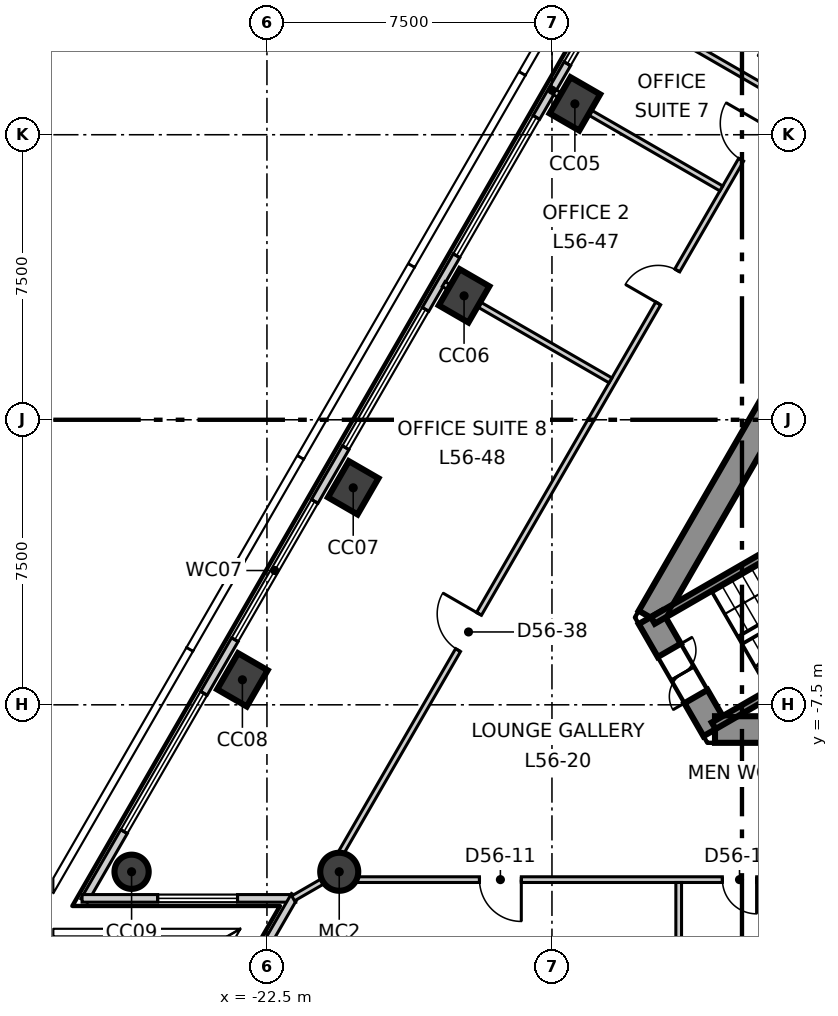
"""IFC4 building model, lengths in metres.
Left out: names, types, materials, properties, quantities, classifications, styles, units other than length and angle.
Written with IfcOpenShell. Run it as: python <this file> out.ifc"""

import sys

from ifc_helpers import new_model, si_unit, direction, frame, frame_2d, origin, origin_2d, place, context, subcontext, project, spatial, polyline, rectangle, circle, outline, extrude, element, fill, save


model = new_model("IFC4")
c1 = context("Model", 3, precision=1e-05, world=origin(), true_north=direction((0.0, 1.0)))
c2 = subcontext(c1, "Body", "Model", "MODEL_VIEW")
j1 = project(units=[si_unit("LENGTHUNIT", "METRE"), si_unit("PLANEANGLEUNIT", "RADIAN")], contexts=[c1])
p1 = place(None, origin())
s1 = spatial("IfcSite", under=j1, at=p1, CompositionType="ELEMENT")
p2 = place(p1, origin())
s2 = spatial("IfcBuilding", under=s1, at=p2, CompositionType="ELEMENT")
p3 = place(p2, frame((0.0, 0.0, 239.3)))
s3 = spatial("IfcBuildingStorey", under=s2, at=p3, CompositionType="ELEMENT", Elevation=239.3)
p4 = place(p3, frame((-1.703, 13.35, -0.3), z_axis=(0.0, 0.0, 1.0), x_axis=(-0.500011533395, -0.866018744874, 0.0)))
e1 = element("IfcWall", 1, at=p4, inside=s3, PredefinedType="SHEAR", context=c2, shape_type="SweptSolid", body=[
    extrude(outline(polyline([(-0.202, -0.35), (1.782, -0.35), (3.766, -0.35), (5.75, -0.35), (7.734, -0.35), (9.718, -0.35), (11.702, -0.35), (13.686, -0.35), (15.67, -0.35), (17.654, -0.35), (19.638, -0.35), (21.622, -0.35), (21.218, 0.35), (19.307, 0.35), (17.397, 0.35), (15.486, 0.35), (13.576, 0.35), (11.665, 0.35), (9.755, 0.35), (7.844, 0.35), (5.934, 0.35), (4.023, 0.35), (2.113, 0.35), (0.202, 0.35), (-0.202, -0.35)])), origin(), (0.0, 0.0, 1.0), 4.0),
])
p5 = place(p4, frame((10.16, 0.0, 0.3)))
e2 = element("IfcOpeningElement", 2, at=p5, cuts=e1, PredefinedType="OPENING", context=c2, shape_type="SweptSolid", body=[
    extrude(rectangle(XDim=1.1, YDim=2.1, at=frame_2d((0.55, 1.05))), frame((0.0, 0.36, 0.0), z_axis=(0.0, -1.0, 0.0), x_axis=(1.0, 0.0, 0.0)), (0.0, 0.0, 1.0), 0.72),
])
p6 = place(p3, frame((-12.413, -5.2, -0.3), z_axis=(0.0, 0.0, 1.0), x_axis=(0.49999337185, -0.866029230515, 0.0)))
e3 = element("IfcWall", 3, at=p6, inside=s3, PredefinedType="SHEAR", context=c2, shape_type="SweptSolid", body=[
    extrude(outline(polyline([(-0.202, -0.35), (1.703, -0.35), (3.608, -0.35), (3.204, 0.35), (1.703, 0.35), (0.202, 0.35), (-0.202, -0.35)])), origin(), (0.0, 0.0, 1.0), 4.0),
])
p7 = place(p6, frame((1.003, 0.0, 0.3)))
e4 = element("IfcOpeningElement", 4, at=p7, cuts=e3, PredefinedType="OPENING", context=c2, shape_type="SweptSolid", body=[
    extrude(rectangle(XDim=1.4, YDim=2.1, at=frame_2d((0.7, 1.05))), frame((0.0, 0.36, 0.0), z_axis=(0.0, -1.0, 0.0), x_axis=(1.0, 0.0, 0.0)), (0.0, 0.0, 1.0), 0.72),
])
p8 = place(p3, frame((-10.71, -8.15, -0.3), z_axis=(0.0, 0.0, 1.0), x_axis=(1.0, 0.0, 0.0)))
e5 = element("IfcWall", 5, at=p8, inside=s3, PredefinedType="SHEAR", context=c2, shape_type="SweptSolid", body=[
    extrude(outline(polyline([(-0.202, -0.35), (1.782, -0.35), (3.766, -0.35), (5.75, -0.35), (7.734, -0.35), (9.718, -0.35), (11.702, -0.35), (13.686, -0.35), (15.67, -0.35), (17.654, -0.35), (19.638, -0.35), (21.622, -0.35), (21.218, 0.35), (19.307, 0.35), (17.397, 0.35), (15.486, 0.35), (13.576, 0.35), (11.665, 0.35), (9.755, 0.35), (7.844, 0.35), (5.934, 0.35), (4.023, 0.35), (2.113, 0.35), (0.202, 0.35), (-0.202, -0.35)])), origin(), (0.0, 0.0, 1.0), 4.0),
])
p9 = place(p8, frame((9.81, 0.0, 0.3)))
e6 = element("IfcOpeningElement", 6, at=p9, cuts=e5, PredefinedType="OPENING", context=c2, shape_type="SweptSolid", body=[
    extrude(rectangle(XDim=1.8, YDim=2.1, at=frame_2d((0.9, 1.05))), frame((0.0, 0.36, 0.0), z_axis=(0.0, -1.0, 0.0), x_axis=(1.0, 0.0, 0.0)), (0.0, 0.0, 1.0), 0.72),
])
for number, where, z_axis, x_axis in (
    (7, (-14.397, 8.312, -0.3), (0.0, 0.0, 1.0), (0.5, 0.866, 0.0)),
    (8, (-17.313, 3.261, -0.3), (0.0, 0.0, 1.0), (0.5, 0.866, 0.0)),
    (9, (-20.23, -1.79, -0.3), (0.0, 0.0, 1.0), (0.5, 0.866, 0.0)),
    (10, (-23.146, -6.842, -0.3), (0.0, 0.0, 1.0), (0.5, 0.866, 0.0)),
):
    element("IfcColumn", number, at=place(p3, frame(where, z_axis=z_axis, x_axis=x_axis)), inside=s3, PredefinedType="COLUMN", context=c2, shape_type="SweptSolid", body=[
        extrude(rectangle(XDim=1.1, YDim=0.9, at=origin_2d()), origin(), (0.0, 0.0, 1.0), 4.0),
    ])
p10 = place(p3, frame((-26.062, -11.893, -0.3), z_axis=(0.0, 0.0, 1.0), x_axis=(0.5, 0.866025403784, 0.0)))
e11 = element("IfcColumn", 11, at=p10, inside=s3, PredefinedType="COLUMN", context=c2, shape_type="SweptSolid", body=[
    extrude(circle(Radius=0.45, at=origin_2d()), origin(), (0.0, 0.0, 1.0), 4.0),
])
p11 = place(p3, frame((-20.598, -11.893, -0.3), z_axis=(0.0, 0.0, 1.0), x_axis=(1.0, 0.0, 0.0)))
e12 = element("IfcColumn", 12, at=p11, inside=s3, PredefinedType="COLUMN", context=c2, shape_type="SweptSolid", body=[
    extrude(circle(Radius=0.5, at=origin_2d()), origin(), (0.0, 0.0, 1.0), 4.0),
])
p12 = place(p3, frame((-2.687, 29.995, 0.0), z_axis=(0.0, 0.0, 1.0), x_axis=(-0.499992950893, -0.86602947355, 0.0)))
e13 = element("IfcWall", 13, at=p12, inside=s3, PredefinedType="ELEMENTEDWALL", context=c2, shape_type="SweptSolid", body=[
    extrude(rectangle(XDim=49.247, YDim=0.2, at=frame_2d((24.624, 0.0))), origin(), (0.0, 0.0, 1.0), 3.7),
])
p13 = place(p12, frame((2.119, 0.0, 0.9)))
e14 = element("IfcOpeningElement", 14, at=p13, cuts=e13, PredefinedType="OPENING", context=c2, shape_type="SweptSolid", body=[
    extrude(rectangle(XDim=4.2, YDim=2.5, at=frame_2d((2.1, 1.25))), frame((0.0, 0.11, 0.0), z_axis=(0.0, -1.0, 0.0), x_axis=(1.0, 0.0, 0.0)), (0.0, 0.0, 1.0), 0.22),
])
p14 = place(p12, frame((7.951, 0.0, 0.9)))
e15 = element("IfcOpeningElement", 15, at=p14, cuts=e13, PredefinedType="OPENING", context=c2, shape_type="SweptSolid", body=[
    extrude(rectangle(XDim=4.2, YDim=2.5, at=frame_2d((2.1, 1.25))), frame((0.0, 0.11, 0.0), z_axis=(0.0, -1.0, 0.0), x_axis=(1.0, 0.0, 0.0)), (0.0, 0.0, 1.0), 0.22),
])
p15 = place(p12, frame((13.784, 0.0, 0.9)))
e16 = element("IfcOpeningElement", 16, at=p15, cuts=e13, PredefinedType="OPENING", context=c2, shape_type="SweptSolid", body=[
    extrude(rectangle(XDim=4.2, YDim=2.5, at=frame_2d((2.1, 1.25))), frame((0.0, 0.11, 0.0), z_axis=(0.0, -1.0, 0.0), x_axis=(1.0, 0.0, 0.0)), (0.0, 0.0, 1.0), 0.22),
])
p16 = place(p12, frame((19.617, 0.0, 0.9)))
e17 = element("IfcOpeningElement", 17, at=p16, cuts=e13, PredefinedType="OPENING", context=c2, shape_type="SweptSolid", body=[
    extrude(rectangle(XDim=4.2, YDim=2.5, at=frame_2d((2.1, 1.25))), frame((0.0, 0.11, 0.0), z_axis=(0.0, -1.0, 0.0), x_axis=(1.0, 0.0, 0.0)), (0.0, 0.0, 1.0), 0.22),
])
p17 = place(p12, frame((25.449, 0.0, 0.9)))
e18 = element("IfcOpeningElement", 18, at=p17, cuts=e13, PredefinedType="OPENING", context=c2, shape_type="SweptSolid", body=[
    extrude(rectangle(XDim=4.2, YDim=2.5, at=frame_2d((2.1, 1.25))), frame((0.0, 0.11, 0.0), z_axis=(0.0, -1.0, 0.0), x_axis=(1.0, 0.0, 0.0)), (0.0, 0.0, 1.0), 0.22),
])
p18 = place(p12, frame((31.282, 0.0, 0.9)))
e19 = element("IfcOpeningElement", 19, at=p18, cuts=e13, PredefinedType="OPENING", context=c2, shape_type="SweptSolid", body=[
    extrude(rectangle(XDim=4.2, YDim=2.5, at=frame_2d((2.1, 1.25))), frame((0.0, 0.11, 0.0), z_axis=(0.0, -1.0, 0.0), x_axis=(1.0, 0.0, 0.0)), (0.0, 0.0, 1.0), 0.22),
])
p19 = place(p12, frame((37.115, 0.0, 0.9)))
e20 = element("IfcOpeningElement", 20, at=p19, cuts=e13, PredefinedType="OPENING", context=c2, shape_type="SweptSolid", body=[
    extrude(rectangle(XDim=4.2, YDim=2.5, at=frame_2d((2.1, 1.25))), frame((0.0, 0.11, 0.0), z_axis=(0.0, -1.0, 0.0), x_axis=(1.0, 0.0, 0.0)), (0.0, 0.0, 1.0), 0.22),
])
p20 = place(p12, frame((42.947, 0.0, 0.9)))
e21 = element("IfcOpeningElement", 21, at=p20, cuts=e13, PredefinedType="OPENING", context=c2, shape_type="SweptSolid", body=[
    extrude(rectangle(XDim=4.2, YDim=2.5, at=frame_2d((2.1, 1.25))), frame((0.0, 0.11, 0.0), z_axis=(0.0, -1.0, 0.0), x_axis=(1.0, 0.0, 0.0)), (0.0, 0.0, 1.0), 0.22),
])
p21 = place(p3, frame((-27.365, -12.593, 0.0), z_axis=(0.0, 0.0, 1.0), x_axis=(1.0, 0.0, 0.0)))
e22 = element("IfcWall", 22, at=p21, inside=s3, PredefinedType="ELEMENTEDWALL", context=c2, shape_type="SweptSolid", body=[
    extrude(rectangle(XDim=5.624, YDim=0.2, at=frame_2d((2.812, 0.0))), origin(), (0.0, 0.0, 1.0), 3.7),
])
p22 = place(p21, frame((1.99, 0.0, 0.9)))
e23 = element("IfcOpeningElement", 23, at=p22, cuts=e22, PredefinedType="OPENING", context=c2, shape_type="SweptSolid", body=[
    extrude(rectangle(XDim=2.1, YDim=2.5, at=frame_2d((1.05, 1.25))), frame((0.0, 0.11, 0.0), z_axis=(0.0, -1.0, 0.0), x_axis=(1.0, 0.0, 0.0)), (0.0, 0.0, 1.0), 0.22),
])
p23 = place(p3, frame((-21.766, -12.515, 0.0), z_axis=(0.0, 0.0, 1.0), x_axis=(-0.500000548001, -0.866025087395, 0.0)))
e24 = element("IfcWall", 24, at=p23, inside=s3, PredefinedType="ELEMENTEDWALL", context=c2, shape_type="SweptSolid", body=[
    extrude(rectangle(XDim=5.624, YDim=0.2, at=frame_2d((2.812, 0.0))), origin(), (0.0, 0.0, 1.0), 3.7),
])
p24 = place(p23, frame((1.39, 0.0, 0.9)))
e25 = element("IfcOpeningElement", 25, at=p24, cuts=e24, PredefinedType="OPENING", context=c2, shape_type="SweptSolid", body=[
    extrude(rectangle(XDim=2.1, YDim=2.5, at=frame_2d((1.05, 1.25))), frame((0.0, 0.11, 0.0), z_axis=(0.0, -1.0, 0.0), x_axis=(1.0, 0.0, 0.0)), (0.0, 0.0, 1.0), 0.22),
])
p25 = place(p3, frame((-21.811, -12.593, 0.0), z_axis=(0.0, 0.0, 1.0), x_axis=(0.866086641072, 0.499893918903, 0.0)))
e26 = element("IfcWall", 26, at=p25, inside=s3, PredefinedType="PARTITIONING", context=c2, shape_type="SweptSolid", body=[
    extrude(rectangle(XDim=0.986, YDim=0.15, at=frame_2d((0.493, 0.0))), origin(), (0.0, 0.0, 1.0), 3.7),
])
p26 = place(p3, frame((-20.807, -12.1, 0.0), z_axis=(0.0, 0.0, 1.0), x_axis=(1.0, 0.0, 0.0)))
e27 = element("IfcWall", 27, at=p26, inside=s3, PredefinedType="PARTITIONING", context=c2, shape_type="SweptSolid", body=[
    extrude(rectangle(XDim=41.764, YDim=0.15, at=frame_2d((20.882, 0.0))), origin(), (0.0, 0.0, 1.0), 3.7),
])
p27 = place(p26, frame((3.9, 0.0, 0.0)))
e28 = element("IfcOpeningElement", 28, at=p27, cuts=e27, PredefinedType="OPENING", context=c2, shape_type="SweptSolid", body=[
    extrude(rectangle(XDim=1.1, YDim=2.1, at=frame_2d((0.55, 1.05))), frame((0.0, 0.085, 0.0), z_axis=(0.0, -1.0, 0.0), x_axis=(1.0, 0.0, 0.0)), (0.0, 0.0, 1.0), 0.17),
])
p28 = place(p26, frame((18.792, 0.0, 0.0)))
e29 = element("IfcOpeningElement", 29, at=p28, cuts=e27, PredefinedType="OPENING", context=c2, shape_type="SweptSolid", body=[
    extrude(rectangle(XDim=1.1, YDim=2.1, at=frame_2d((0.55, 1.05))), frame((0.0, 0.085, 0.0), z_axis=(0.0, -1.0, 0.0), x_axis=(1.0, 0.0, 0.0)), (0.0, 0.0, 1.0), 0.17),
])
p29 = place(p26, frame((10.292, 0.0, 0.0)))
e30 = element("IfcOpeningElement", 30, at=p29, cuts=e27, PredefinedType="OPENING", context=c2, shape_type="SweptSolid", body=[
    extrude(rectangle(XDim=0.9, YDim=2.1, at=frame_2d((0.45, 1.05))), frame((0.0, 0.085, 0.0), z_axis=(0.0, -1.0, 0.0), x_axis=(1.0, 0.0, 0.0)), (0.0, 0.0, 1.0), 0.17),
])
p30 = place(p26, frame((13.492, 0.0, 0.0)))
e31 = element("IfcOpeningElement", 31, at=p30, cuts=e27, PredefinedType="OPENING", context=c2, shape_type="SweptSolid", body=[
    extrude(rectangle(XDim=0.9, YDim=2.1, at=frame_2d((0.45, 1.05))), frame((0.0, 0.085, 0.0), z_axis=(0.0, -1.0, 0.0), x_axis=(1.0, 0.0, 0.0)), (0.0, 0.0, 1.0), 0.17),
])
p31 = place(p26, frame((16.292, 0.0, 0.0)))
e32 = element("IfcOpeningElement", 32, at=p31, cuts=e27, PredefinedType="OPENING", context=c2, shape_type="SweptSolid", body=[
    extrude(rectangle(XDim=1.0, YDim=2.1, at=frame_2d((0.5, 1.05))), frame((0.0, 0.085, 0.0), z_axis=(0.0, -1.0, 0.0), x_axis=(1.0, 0.0, 0.0)), (0.0, 0.0, 1.0), 0.17),
])
p32 = place(p26, frame((29.057, 0.0, 0.0)))
e33 = element("IfcOpeningElement", 33, at=p32, cuts=e27, PredefinedType="OPENING", context=c2, shape_type="SweptSolid", body=[
    extrude(rectangle(XDim=1.1, YDim=2.1, at=frame_2d((0.55, 1.05))), frame((0.0, 0.085, 0.0), z_axis=(0.0, -1.0, 0.0), x_axis=(1.0, 0.0, 0.0)), (0.0, 0.0, 1.0), 0.17),
])
p33 = place(p26, frame((22.157, 0.0, 0.0)))
e34 = element("IfcOpeningElement", 34, at=p33, cuts=e27, PredefinedType="OPENING", context=c2, shape_type="SweptSolid", body=[
    extrude(rectangle(XDim=0.9, YDim=2.1, at=frame_2d((0.45, 1.05))), frame((0.0, 0.085, 0.0), z_axis=(0.0, -1.0, 0.0), x_axis=(1.0, 0.0, 0.0)), (0.0, 0.0, 1.0), 0.17),
])
p34 = place(p26, frame((25.157, 0.0, 0.0)))
e35 = element("IfcOpeningElement", 35, at=p34, cuts=e27, PredefinedType="OPENING", context=c2, shape_type="SweptSolid", body=[
    extrude(rectangle(XDim=0.9, YDim=2.1, at=frame_2d((0.45, 1.05))), frame((0.0, 0.085, 0.0), z_axis=(0.0, -1.0, 0.0), x_axis=(1.0, 0.0, 0.0)), (0.0, 0.0, 1.0), 0.17),
])
p35 = place(p26, frame((36.522, 0.0, 0.0)))
e36 = element("IfcOpeningElement", 36, at=p35, cuts=e27, PredefinedType="OPENING", context=c2, shape_type="SweptSolid", body=[
    extrude(rectangle(XDim=1.1, YDim=2.1, at=frame_2d((0.55, 1.05))), frame((0.0, 0.085, 0.0), z_axis=(0.0, -1.0, 0.0), x_axis=(1.0, 0.0, 0.0)), (0.0, 0.0, 1.0), 0.17),
])
p36 = place(p3, frame((-20.883, -11.97, 0.0), z_axis=(0.0, 0.0, 1.0), x_axis=(0.500006150555, 0.866021852731, 0.0)))
e37 = element("IfcWall", 37, at=p36, inside=s3, PredefinedType="PARTITIONING", context=c2, shape_type="SweptSolid", body=[
    extrude(rectangle(XDim=41.766, YDim=0.15, at=frame_2d((20.883, 0.0))), origin(), (0.0, 0.0, 1.0), 3.7),
])
p37 = place(p36, frame((36.616, 0.0, 0.0)))
e38 = element("IfcOpeningElement", 38, at=p37, cuts=e37, PredefinedType="OPENING", context=c2, shape_type="SweptSolid", body=[
    extrude(rectangle(XDim=1.1, YDim=2.1, at=frame_2d((0.55, 1.05))), frame((0.0, 0.085, 0.0), z_axis=(0.0, -1.0, 0.0), x_axis=(1.0, 0.0, 0.0)), (0.0, 0.0, 1.0), 0.17),
])
p38 = place(p36, frame((21.723, 0.0, 0.0)))
e39 = element("IfcOpeningElement", 39, at=p38, cuts=e37, PredefinedType="OPENING", context=c2, shape_type="SweptSolid", body=[
    extrude(rectangle(XDim=1.1, YDim=2.1, at=frame_2d((0.55, 1.05))), frame((0.0, 0.085, 0.0), z_axis=(0.0, -1.0, 0.0), x_axis=(1.0, 0.0, 0.0)), (0.0, 0.0, 1.0), 0.17),
])
p39 = place(p36, frame((30.423, 0.0, 0.0)))
e40 = element("IfcOpeningElement", 40, at=p39, cuts=e37, PredefinedType="OPENING", context=c2, shape_type="SweptSolid", body=[
    extrude(rectangle(XDim=0.9, YDim=2.1, at=frame_2d((0.45, 1.05))), frame((0.0, 0.085, 0.0), z_axis=(0.0, -1.0, 0.0), x_axis=(1.0, 0.0, 0.0)), (0.0, 0.0, 1.0), 0.17),
])
p40 = place(p36, frame((27.223, 0.0, 0.0)))
e41 = element("IfcOpeningElement", 41, at=p40, cuts=e37, PredefinedType="OPENING", context=c2, shape_type="SweptSolid", body=[
    extrude(rectangle(XDim=0.9, YDim=2.1, at=frame_2d((0.45, 1.05))), frame((0.0, 0.085, 0.0), z_axis=(0.0, -1.0, 0.0), x_axis=(1.0, 0.0, 0.0)), (0.0, 0.0, 1.0), 0.17),
])
p41 = place(p36, frame((24.323, 0.0, 0.0)))
e42 = element("IfcOpeningElement", 42, at=p41, cuts=e37, PredefinedType="OPENING", context=c2, shape_type="SweptSolid", body=[
    extrude(rectangle(XDim=1.0, YDim=2.1, at=frame_2d((0.5, 1.05))), frame((0.0, 0.085, 0.0), z_axis=(0.0, -1.0, 0.0), x_axis=(1.0, 0.0, 0.0)), (0.0, 0.0, 1.0), 0.17),
])
p42 = place(p36, frame((17.358, 0.0, 0.0)))
e43 = element("IfcOpeningElement", 43, at=p42, cuts=e37, PredefinedType="OPENING", context=c2, shape_type="SweptSolid", body=[
    extrude(rectangle(XDim=1.0, YDim=2.1, at=frame_2d((0.5, 1.05))), frame((0.0, 0.085, 0.0), z_axis=(0.0, -1.0, 0.0), x_axis=(1.0, 0.0, 0.0)), (0.0, 0.0, 1.0), 0.17),
])
p43 = place(p36, frame((6.825, 0.0, 0.0)))
e44 = element("IfcOpeningElement", 44, at=p43, cuts=e37, PredefinedType="OPENING", context=c2, shape_type="SweptSolid", body=[
    extrude(rectangle(XDim=1.1, YDim=2.1, at=frame_2d((0.55, 1.05))), frame((0.0, 0.085, 0.0), z_axis=(0.0, -1.0, 0.0), x_axis=(1.0, 0.0, 0.0)), (0.0, 0.0, 1.0), 0.17),
])
p44 = place(p3, frame((-17.85, 3.571, 0.0), z_axis=(0.0, 0.0, 1.0), x_axis=(0.866086140321, -0.499894786475, 0.0)))
e45 = element("IfcWall", 45, at=p44, inside=s3, PredefinedType="PARTITIONING", context=c2, shape_type="SweptSolid", body=[
    extrude(rectangle(XDim=5.069, YDim=0.15, at=frame_2d((2.534, 0.0))), origin(), (0.0, 0.0, 1.0), 3.7),
])
p45 = place(p3, frame((-14.934, 8.622, 0.0), z_axis=(0.0, 0.0, 1.0), x_axis=(0.86598187042, -0.500075394419, 0.0)))
e46 = element("IfcWall", 46, at=p45, inside=s3, PredefinedType="PARTITIONING", context=c2, shape_type="SweptSolid", body=[
    extrude(rectangle(XDim=5.07, YDim=0.15, at=frame_2d((2.535, 0.0))), origin(), (0.0, 0.0, 1.0), 3.2),
])
p46 = place(p3, frame((-11.665, -17.244, 0.0), z_axis=(0.0, 0.0, 1.0), x_axis=(0.0, 1.0, 0.0)))
e47 = element("IfcWall", 47, at=p46, inside=s3, PredefinedType="PARTITIONING", context=c2, shape_type="SweptSolid", body=[
    extrude(rectangle(XDim=5.069, YDim=0.15, at=frame_2d((2.534, 0.0))), origin(), (0.0, 0.0, 1.0), 3.7),
])
p47 = place(p3, frame((-11.244, 9.8, 0.0), z_axis=(0.0, 0.0, 1.0), x_axis=(0.866099746043, -0.499871213318, 0.0)))
e48 = element("IfcWall", 48, at=p47, inside=s3, PredefinedType="PARTITIONING", context=c2, shape_type="SweptSolid", body=[
    extrude(rectangle(XDim=2.463, YDim=0.15, at=frame_2d((1.231, 0.0))), origin(), (0.0, 0.0, 1.0), 3.7),
])
p48 = place(p3, frame((-12.344, -5.279, 0.0), z_axis=(0.0, 0.0, 1.0), x_axis=(0.866046323291, 0.499963764601, 0.0)))
e49 = element("IfcWall", 49, at=p48, inside=s3, PredefinedType="SOLIDWALL", context=c2, shape_type="SweptSolid", body=[
    extrude(rectangle(XDim=6.714, YDim=0.2, at=frame_2d((3.357, 0.0))), origin(), (0.0, 0.0, 1.0), 3.7),
])
p49 = place(p3, frame((-10.744, -8.051, 0.0), z_axis=(0.0, 0.0, 1.0), x_axis=(0.865983344943, 0.500072840975, 0.0)))
e50 = element("IfcWall", 50, at=p49, inside=s3, PredefinedType="SOLIDWALL", context=c2, shape_type="SweptSolid", body=[
    extrude(rectangle(XDim=6.715, YDim=0.2, at=frame_2d((3.357, 0.0))), origin(), (0.0, 0.0, 1.0), 3.7),
])
p50 = place(p16, origin())
e51 = element("IfcWindow", 51, at=p50, inside=s3, PartitioningType="SINGLE_PANEL", PredefinedType="WINDOW", context=c2, shape_type="SweptSolid", body=[
    extrude(rectangle(XDim=4.2, YDim=2.5, at=frame_2d((2.1, 1.25))), frame((0.0, 0.03, 0.0), z_axis=(0.0, -1.0, 0.0), x_axis=(1.0, 0.0, 0.0)), (0.0, 0.0, 1.0), 0.06),
])
fill(e17, e51)
p51 = place(p17, origin())
e52 = element("IfcWindow", 52, at=p51, inside=s3, PartitioningType="SINGLE_PANEL", PredefinedType="WINDOW", context=c2, shape_type="SweptSolid", body=[
    extrude(rectangle(XDim=4.2, YDim=2.5, at=frame_2d((2.1, 1.25))), frame((0.0, 0.03, 0.0), z_axis=(0.0, -1.0, 0.0), x_axis=(1.0, 0.0, 0.0)), (0.0, 0.0, 1.0), 0.06),
])
fill(e18, e52)
p52 = place(p18, origin())
e53 = element("IfcWindow", 53, at=p52, inside=s3, PartitioningType="SINGLE_PANEL", PredefinedType="WINDOW", context=c2, shape_type="SweptSolid", body=[
    extrude(rectangle(XDim=4.2, YDim=2.5, at=frame_2d((2.1, 1.25))), frame((0.0, 0.03, 0.0), z_axis=(0.0, -1.0, 0.0), x_axis=(1.0, 0.0, 0.0)), (0.0, 0.0, 1.0), 0.06),
])
fill(e19, e53)
p53 = place(p19, origin())
e54 = element("IfcWindow", 54, at=p53, inside=s3, PartitioningType="SINGLE_PANEL", PredefinedType="WINDOW", context=c2, shape_type="SweptSolid", body=[
    extrude(rectangle(XDim=4.2, YDim=2.5, at=frame_2d((2.1, 1.25))), frame((0.0, 0.03, 0.0), z_axis=(0.0, -1.0, 0.0), x_axis=(1.0, 0.0, 0.0)), (0.0, 0.0, 1.0), 0.06),
])
fill(e20, e54)
p54 = place(p20, origin())
e55 = element("IfcWindow", 55, at=p54, inside=s3, PartitioningType="SINGLE_PANEL", PredefinedType="WINDOW", context=c2, shape_type="SweptSolid", body=[
    extrude(rectangle(XDim=4.2, YDim=2.5, at=frame_2d((2.1, 1.25))), frame((0.0, 0.03, 0.0), z_axis=(0.0, -1.0, 0.0), x_axis=(1.0, 0.0, 0.0)), (0.0, 0.0, 1.0), 0.06),
])
fill(e21, e55)
p55 = place(p22, origin())
e56 = element("IfcWindow", 56, at=p55, inside=s3, PartitioningType="SINGLE_PANEL", PredefinedType="WINDOW", context=c2, shape_type="SweptSolid", body=[
    extrude(rectangle(XDim=2.1, YDim=2.5, at=frame_2d((1.05, 1.25))), frame((0.0, 0.03, 0.0), z_axis=(0.0, -1.0, 0.0), x_axis=(1.0, 0.0, 0.0)), (0.0, 0.0, 1.0), 0.06),
])
fill(e23, e56)
p56 = place(p27, origin())
e57 = element("IfcDoor", 57, at=p56, inside=s3, OperationType="SINGLE_SWING_RIGHT", PredefinedType="DOOR", context=c2, shape_type="SweptSolid", body=[
    extrude(rectangle(XDim=1.1, YDim=2.1, at=frame_2d((0.55, 1.05))), frame((0.0, 0.025, 0.0), z_axis=(0.0, -1.0, 0.0), x_axis=(1.0, 0.0, 0.0)), (0.0, 0.0, 1.0), 0.05),
])
fill(e28, e57)
p57 = place(p29, origin())
e58 = element("IfcDoor", 58, at=p57, inside=s3, OperationType="SINGLE_SWING_RIGHT", PredefinedType="DOOR", context=c2, shape_type="SweptSolid", body=[
    extrude(rectangle(XDim=0.9, YDim=2.1, at=frame_2d((0.45, 1.05))), frame((0.0, 0.025, 0.0), z_axis=(0.0, -1.0, 0.0), x_axis=(1.0, 0.0, 0.0)), (0.0, 0.0, 1.0), 0.05),
])
fill(e30, e58)
p58 = place(p38, origin())
e59 = element("IfcDoor", 59, at=p58, inside=s3, OperationType="SINGLE_SWING_LEFT", PredefinedType="DOOR", context=c2, shape_type="SweptSolid", body=[
    extrude(rectangle(XDim=1.1, YDim=2.1, at=frame_2d((0.55, 1.05))), frame((0.0, 0.025, 0.0), z_axis=(0.0, -1.0, 0.0), x_axis=(1.0, 0.0, 0.0)), (0.0, 0.0, 1.0), 0.05),
])
fill(e39, e59)
p59 = place(p42, origin())
e60 = element("IfcDoor", 60, at=p59, inside=s3, OperationType="SINGLE_SWING_RIGHT", PredefinedType="DOOR", context=c2, shape_type="SweptSolid", body=[
    extrude(rectangle(XDim=1.0, YDim=2.1, at=frame_2d((0.5, 1.05))), frame((0.0, 0.025, 0.0), z_axis=(0.0, -1.0, 0.0), x_axis=(1.0, 0.0, 0.0)), (0.0, 0.0, 1.0), 0.05),
])
fill(e43, e60)
p60 = place(p43, origin())
e61 = element("IfcDoor", 61, at=p60, inside=s3, OperationType="SINGLE_SWING_LEFT", PredefinedType="DOOR", context=c2, shape_type="SweptSolid", body=[
    extrude(rectangle(XDim=1.1, YDim=2.1, at=frame_2d((0.55, 1.05))), frame((0.0, 0.025, 0.0), z_axis=(0.0, -1.0, 0.0), x_axis=(1.0, 0.0, 0.0)), (0.0, 0.0, 1.0), 0.05),
])
fill(e44, e61)
p61 = place(p7, origin())
e62 = element("IfcDoor", 62, at=p61, inside=s3, OperationType="DOUBLE_DOOR_SINGLE_SWING", PredefinedType="DOOR", context=c2, shape_type="SweptSolid", body=[
    extrude(rectangle(XDim=1.4, YDim=2.1, at=frame_2d((0.7, 1.05))), frame((0.0, 0.025, 0.0), z_axis=(0.0, -1.0, 0.0), x_axis=(1.0, 0.0, 0.0)), (0.0, 0.0, 1.0), 0.05),
])
fill(e4, e62)
save(model, sys.argv[1])
